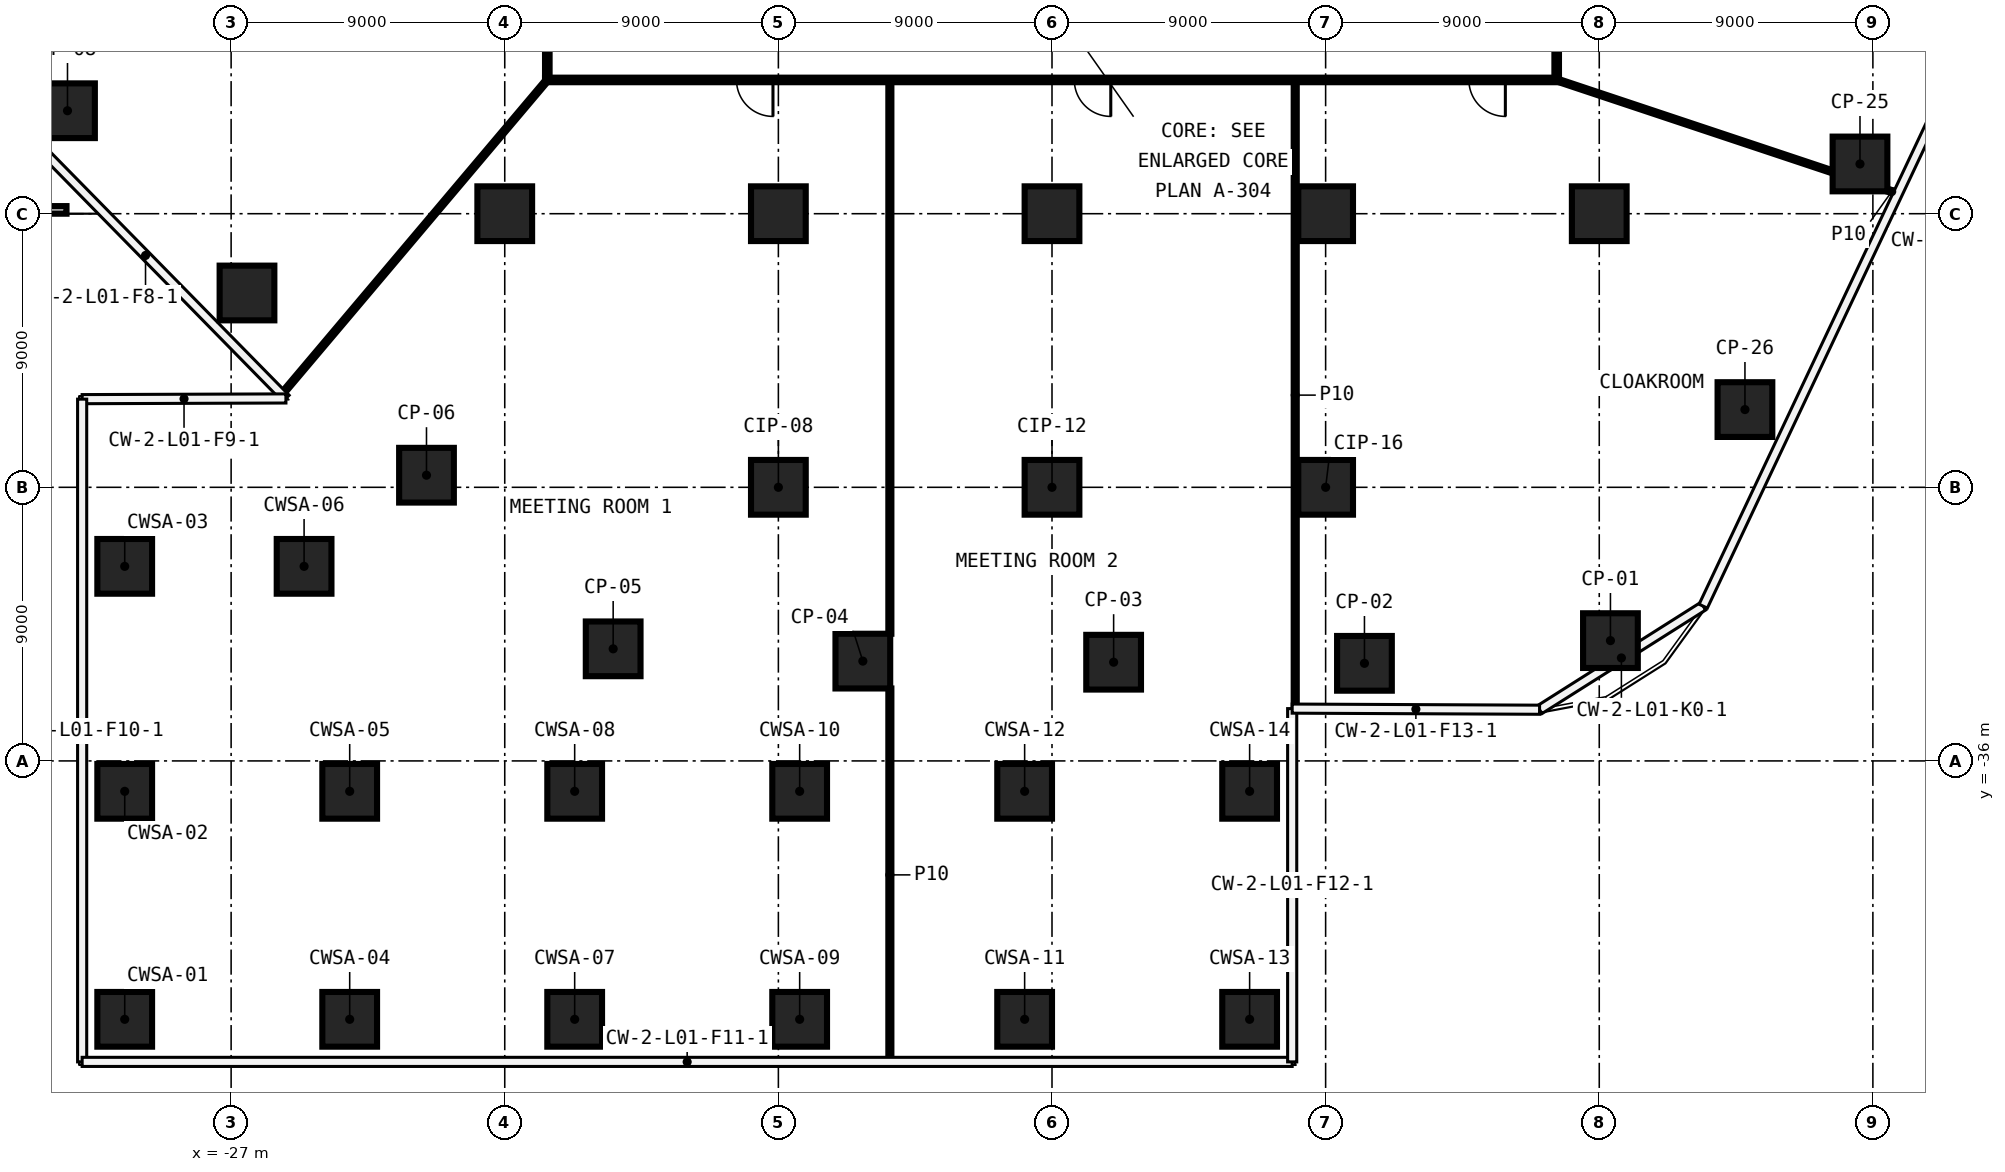
"""IFC4 building model, lengths in metres.
Left out: names, types, materials, properties, quantities, classifications, styles, units other than length and angle.
Written with IfcOpenShell. Run it as: python <this file> out.ifc"""

import sys

from ifc_helpers import new_model, si_unit, direction, frame, frame_2d, origin, origin_2d, place, context, subcontext, project, spatial, rectangle, extrude, element, fill, save


model = new_model("IFC4")
c1 = context("Model", 3, precision=1e-05, world=origin(), true_north=direction((0.0, 1.0)))
c2 = subcontext(c1, "Body", "Model", "MODEL_VIEW")
j1 = project(units=[si_unit("LENGTHUNIT", "METRE"), si_unit("PLANEANGLEUNIT", "RADIAN")], contexts=[c1])
p1 = place(None, origin())
s1 = spatial("IfcSite", under=j1, at=p1, CompositionType="ELEMENT")
p2 = place(p1, origin())
s2 = spatial("IfcBuilding", under=s1, at=p2, CompositionType="ELEMENT")
p3 = place(p2, frame((0.0, 0.0, 9.0)))
s3 = spatial("IfcBuildingStorey", under=s2, at=p3, CompositionType="ELEMENT", Elevation=9.0)
for number, where, z_axis, x_axis in (
    (1, (18.368, -32.043, 0.0), (0.0, 0.0, 1.0), (1.0, 0.0, 0.0)),
    (2, (10.277, -32.79, 0.0), (0.0, 0.0, 1.0), (1.0, 0.0, 0.0)),
    (3, (2.027, -32.753, 0.0), (0.0, 0.0, 1.0), (1.0, 0.0, 0.0)),
    (4, (-6.222, -32.717, 0.0), (0.0, 0.0, 1.0), (1.0, 0.0, 0.0)),
    (5, (-14.434, -32.313, 0.0), (0.0, 0.0, 1.0), (1.0, 0.0, 0.0)),
    (6, (-20.574, -26.602, 0.0), (0.0, 0.0, 1.0), (1.0, 0.0, 0.0)),
    (7, (-26.478, -20.608, 0.0), (0.0, 0.0, 1.0), (1.0, 0.0, 0.0)),
    (8, (-32.382, -14.613, 0.0), (0.0, 0.0, 1.0), (1.0, 0.0, 0.0)),
    (9, (26.576, -16.364, 0.0), (0.0, 0.0, 1.0), (1.0, 0.0, 0.0)),
    (10, (22.792, -24.443, 0.0), (0.0, 0.0, 1.0), (1.0, 0.0, 0.0)),
    (11, (-18.0, -18.0, 0.0), (0.0, 0.0, 1.0), (1.0, 0.0, 0.0)),
    (12, (-9.0, -27.0, 0.0), (0.0, 0.0, 1.0), (1.0, 0.0, 0.0)),
    (13, (-9.0, -18.0, 0.0), (0.0, 0.0, 1.0), (1.0, 0.0, 0.0)),
    (14, (0.0, -27.0, 0.0), (0.0, 0.0, 1.0), (1.0, 0.0, 0.0)),
    (15, (0.0, -18.0, 0.0), (0.0, 0.0, 1.0), (1.0, 0.0, 0.0)),
    (16, (9.0, -27.0, 0.0), (0.0, 0.0, 1.0), (1.0, 0.0, 0.0)),
    (17, (9.0, -18.0, 0.0), (0.0, 0.0, 1.0), (1.0, 0.0, 0.0)),
    (18, (18.0, -18.0, 0.0), (0.0, 0.0, 1.0), (1.0, 0.0, 0.0)),
    (19, (-30.5, -44.5, 0.0), (0.0, 0.0, 1.0), (1.0, 0.0, 0.0)),
    (20, (-30.5, -37.0, 0.0), (0.0, 0.0, 1.0), (1.0, 0.0, 0.0)),
    (21, (-30.5, -29.6, 0.0), (0.0, 0.0, 1.0), (1.0, 0.0, 0.0)),
    (22, (-23.1, -44.5, 0.0), (0.0, 0.0, 1.0), (1.0, 0.0, 0.0)),
    (23, (-23.1, -37.0, 0.0), (0.0, 0.0, 1.0), (1.0, 0.0, 0.0)),
    (24, (-24.6, -29.6, 0.0), (0.0, 0.0, 1.0), (1.0, 0.0, 0.0)),
    (25, (-15.7, -44.5, 0.0), (0.0, 0.0, 1.0), (1.0, 0.0, 0.0)),
    (26, (-15.7, -37.0, 0.0), (0.0, 0.0, 1.0), (1.0, 0.0, 0.0)),
    (27, (-8.3, -44.5, 0.0), (0.0, 0.0, 1.0), (1.0, 0.0, 0.0)),
    (28, (-8.3, -37.0, 0.0), (0.0, 0.0, 1.0), (1.0, 0.0, 0.0)),
    (29, (-0.9, -44.5, 0.0), (0.0, 0.0, 1.0), (1.0, 0.0, 0.0)),
    (30, (-0.9, -37.0, 0.0), (0.0, 0.0, 1.0), (1.0, 0.0, 0.0)),
    (31, (6.5, -44.5, 0.0), (0.0, 0.0, 1.0), (1.0, 0.0, 0.0)),
    (32, (6.5, -37.0, 0.0), (0.0, 0.0, 1.0), (1.0, 0.0, 0.0)),
):
    element("IfcColumn", number, at=place(p3, frame(where, z_axis=z_axis, x_axis=x_axis)), inside=s3, PredefinedType="COLUMN", context=c2, shape_type="SweptSolid", body=[
        extrude(rectangle(XDim=1.8, YDim=1.8, at=origin_2d()), origin(), (0.0, 0.0, 1.0), 9.55),
    ])
p4 = place(p3, frame((16.675, -13.6, 0.0), z_axis=(0.0, 0.0, 1.0), x_axis=(-1.0, 0.0, 0.0)))
e33 = element("IfcWall", 33, at=p4, inside=s3, PredefinedType="PARTITIONING", context=c2, shape_type="SweptSolid", body=[
    extrude(rectangle(XDim=33.35, YDim=0.15, at=frame_2d((16.675, 0.0))), origin(), (0.0, 0.0, 1.0), 9.55),
])
p5 = place(p4, frame((25.853, 0.0, 0.0)))
e34 = element("IfcOpeningElement", 34, at=p5, cuts=e33, PredefinedType="OPENING", context=c2, shape_type="SweptSolid", body=[
    extrude(rectangle(XDim=1.2, YDim=2.1, at=frame_2d((0.6, 1.05))), frame((0.0, 0.085, 0.0), z_axis=(0.0, -1.0, 0.0), x_axis=(1.0, 0.0, 0.0)), (0.0, 0.0, 1.0), 0.17),
])
p6 = place(p4, frame((14.742, 0.0, 0.0)))
e35 = element("IfcOpeningElement", 35, at=p6, cuts=e33, PredefinedType="OPENING", context=c2, shape_type="SweptSolid", body=[
    extrude(rectangle(XDim=1.2, YDim=2.1, at=frame_2d((0.6, 1.05))), frame((0.0, 0.085, 0.0), z_axis=(0.0, -1.0, 0.0), x_axis=(1.0, 0.0, 0.0)), (0.0, 0.0, 1.0), 0.17),
])
p7 = place(p4, frame((1.764, 0.0, 0.0)))
e36 = element("IfcOpeningElement", 36, at=p7, cuts=e33, PredefinedType="OPENING", context=c2, shape_type="SweptSolid", body=[
    extrude(rectangle(XDim=1.2, YDim=2.1, at=frame_2d((0.6, 1.05))), frame((0.0, 0.085, 0.0), z_axis=(0.0, -1.0, 0.0), x_axis=(1.0, 0.0, 0.0)), (0.0, 0.0, 1.0), 0.17),
])
p8 = place(p3, frame((-25.304, -23.908, 0.0), z_axis=(0.0, 0.0, 1.0), x_axis=(0.645188329464, 0.764023572623, 0.0)))
e37 = element("IfcWall", 37, at=p8, inside=s3, PredefinedType="PARTITIONING", context=c2, shape_type="SweptSolid", body=[
    extrude(rectangle(XDim=13.491, YDim=0.1, at=frame_2d((6.746, 0.0))), origin(), (0.0, 0.0, 1.0), 9.55),
])
p9 = place(p3, frame((16.6, 13.525, 0.0), z_axis=(0.0, 0.0, 1.0), x_axis=(0.0, -1.0, 0.0)))
e38 = element("IfcWall", 38, at=p9, inside=s3, PredefinedType="PARTITIONING", context=c2, shape_type="SweptSolid", body=[
    extrude(rectangle(XDim=27.05, YDim=0.15, at=frame_2d((13.525, 0.0))), origin(), (0.0, 0.0, 1.0), 9.55),
])
p10 = place(p9, frame((17.482, 0.0, 0.0)))
e39 = element("IfcOpeningElement", 39, at=p10, cuts=e38, PredefinedType="OPENING", context=c2, shape_type="SweptSolid", body=[
    extrude(rectangle(XDim=1.2, YDim=2.1, at=frame_2d((0.6, 1.05))), frame((0.0, 0.085, 0.0), z_axis=(0.0, -1.0, 0.0), x_axis=(1.0, 0.0, 0.0)), (0.0, 0.0, 1.0), 0.17),
])
p11 = place(p3, frame((8.0, -34.26, 0.0), z_axis=(0.0, 0.0, 1.0), x_axis=(0.0, 1.0, 0.0)))
e40 = element("IfcWall", 40, at=p11, inside=s3, PredefinedType="PARTITIONING", context=c2, shape_type="SweptSolid", body=[
    extrude(rectangle(XDim=20.585, YDim=0.1, at=frame_2d((10.292, 0.0))), origin(), (0.0, 0.0, 1.0), 9.55),
])
p12 = place(p3, frame((-5.333, -45.88, 0.0), z_axis=(0.0, 0.0, 1.0), x_axis=(0.0, 1.0, 0.0)))
e41 = element("IfcWall", 41, at=p12, inside=s3, PredefinedType="PARTITIONING", context=c2, shape_type="SweptSolid", body=[
    extrude(rectangle(XDim=12.263, YDim=0.1, at=frame_2d((6.131, 0.0))), origin(), (0.0, 0.0, 1.0), 9.55),
])
p13 = place(p3, frame((-5.333, -31.817, 0.0), z_axis=(0.0, 0.0, 1.0), x_axis=(0.0, 1.0, 0.0)))
e42 = element("IfcWall", 42, at=p13, inside=s3, PredefinedType="PARTITIONING", context=c2, shape_type="SweptSolid", body=[
    extrude(rectangle(XDim=18.142, YDim=0.1, at=frame_2d((9.071, 0.0))), origin(), (0.0, 0.0, 1.0), 9.55),
])
p14 = place(p3, frame((-16.6, -13.525, 0.0), z_axis=(0.0, 0.0, 1.0), x_axis=(0.0, 1.0, 0.0)))
e43 = element("IfcWall", 43, at=p14, inside=s3, PredefinedType="PARTITIONING", context=c2, shape_type="SweptSolid", body=[
    extrude(rectangle(XDim=27.05, YDim=0.15, at=frame_2d((13.525, 0.0))), origin(), (0.0, 0.0, 1.0), 9.55),
])
p15 = place(p14, frame((16.028, 0.0, 0.0)))
e44 = element("IfcOpeningElement", 44, at=p15, cuts=e43, PredefinedType="OPENING", context=c2, shape_type="SweptSolid", body=[
    extrude(rectangle(XDim=1.2, YDim=2.1, at=frame_2d((0.6, 1.05))), frame((0.0, 0.085, 0.0), z_axis=(0.0, -1.0, 0.0), x_axis=(1.0, 0.0, 0.0)), (0.0, 0.0, 1.0), 0.17),
])
p16 = place(p14, frame((1.121, 0.0, 0.0)))
e45 = element("IfcOpeningElement", 45, at=p16, cuts=e43, PredefinedType="OPENING", context=c2, shape_type="SweptSolid", body=[
    extrude(rectangle(XDim=1.2, YDim=2.1, at=frame_2d((0.6, 1.05))), frame((0.0, 0.085, 0.0), z_axis=(0.0, -1.0, 0.0), x_axis=(1.0, 0.0, 0.0)), (0.0, 0.0, 1.0), 0.17),
])
p17 = place(p14, frame((24.705, 0.0, 0.0)))
e46 = element("IfcOpeningElement", 46, at=p17, cuts=e43, PredefinedType="OPENING", context=c2, shape_type="SweptSolid", body=[
    extrude(rectangle(XDim=1.2, YDim=2.1, at=frame_2d((0.6, 1.05))), frame((0.0, 0.085, 0.0), z_axis=(0.0, -1.0, 0.0), x_axis=(1.0, 0.0, 0.0)), (0.0, 0.0, 1.0), 0.17),
])
p18 = place(p3, frame((16.6, -13.6, 0.0), z_axis=(0.0, 0.0, 1.0), x_axis=(0.948711366471, -0.316143548294, 0.0)))
e47 = element("IfcWall", 47, at=p18, inside=s3, PredefinedType="PARTITIONING", context=c2, shape_type="SweptSolid", body=[
    extrude(rectangle(XDim=9.567, YDim=0.1, at=frame_2d((4.783, 0.0))), origin(), (0.0, 0.0, 1.0), 9.55),
])
p19 = place(p3, frame((27.476, -17.224, 0.0), z_axis=(0.0, 0.0, 1.0), x_axis=(0.948845092647, -0.31574196769, 0.0)))
e48 = element("IfcWall", 48, at=p19, inside=s3, PredefinedType="PARTITIONING", context=c2, shape_type="SweptSolid", body=[
    extrude(rectangle(XDim=0.302, YDim=0.1, at=frame_2d((0.151, 0.0))), origin(), (0.0, 0.0, 1.0), 9.55),
])
p20 = place(p3, frame((-32.415, -17.875, 0.0), z_axis=(0.0, 0.0, 1.0), x_axis=(-1.0, 0.0, 0.0)))
e49 = element("IfcWall", 49, at=p20, inside=s3, PredefinedType="PARAPET", context=c2, shape_type="SweptSolid", body=[
    extrude(rectangle(XDim=25.585, YDim=0.25, at=frame_2d((12.793, 0.0))), origin(), (0.0, 0.0, 1.0), 1.2),
])
p21 = place(p2, origin())
s4 = spatial("IfcBuildingStorey", under=s2, at=p21, CompositionType="ELEMENT", Elevation=0.0)
for number, where, z_axis, x_axis in (
    (50, (11.5, -45.05, -0.3), (0.0, 0.0, 1.0), (1.0, 0.0, 0.0)),
    (51, (20.61, -45.05, -0.3), (0.0, 0.0, 1.0), (1.0, 0.0, 0.0)),
    (52, (20.61, -36.05, -0.3), (0.0, 0.0, 1.0), (1.0, 0.0, 0.0)),
):
    element("IfcColumn", number, at=place(p21, frame(where, z_axis=z_axis, x_axis=x_axis)), inside=s4, PredefinedType="COLUMN", context=c2, shape_type="SweptSolid", body=[
        extrude(rectangle(XDim=1.0, YDim=1.0, at=origin_2d()), origin(), (0.0, 0.0, 1.0), 18.85),
    ])
p22 = place(p5, origin())
e53 = element("IfcDoor", 53, at=p22, inside=s3, OperationType="SINGLE_SWING_RIGHT", PredefinedType="DOOR", context=c2, shape_type="SweptSolid", body=[
    extrude(rectangle(XDim=1.2, YDim=2.1, at=frame_2d((0.6, 1.05))), frame((0.0, 0.025, 0.0), z_axis=(0.0, -1.0, 0.0), x_axis=(1.0, 0.0, 0.0)), (0.0, 0.0, 1.0), 0.05),
])
fill(e34, e53)
p23 = place(p6, origin())
e54 = element("IfcDoor", 54, at=p23, inside=s3, OperationType="SINGLE_SWING_LEFT", PredefinedType="DOOR", context=c2, shape_type="SweptSolid", body=[
    extrude(rectangle(XDim=1.2, YDim=2.1, at=frame_2d((0.6, 1.05))), frame((0.0, 0.025, 0.0), z_axis=(0.0, -1.0, 0.0), x_axis=(1.0, 0.0, 0.0)), (0.0, 0.0, 1.0), 0.05),
])
fill(e35, e54)
p24 = place(p7, origin())
e55 = element("IfcDoor", 55, at=p24, inside=s3, OperationType="SINGLE_SWING_RIGHT", PredefinedType="DOOR", context=c2, shape_type="SweptSolid", body=[
    extrude(rectangle(XDim=1.2, YDim=2.1, at=frame_2d((0.6, 1.05))), frame((0.0, 0.025, 0.0), z_axis=(0.0, -1.0, 0.0), x_axis=(1.0, 0.0, 0.0)), (0.0, 0.0, 1.0), 0.05),
])
fill(e36, e55)
save(model, sys.argv[1])
